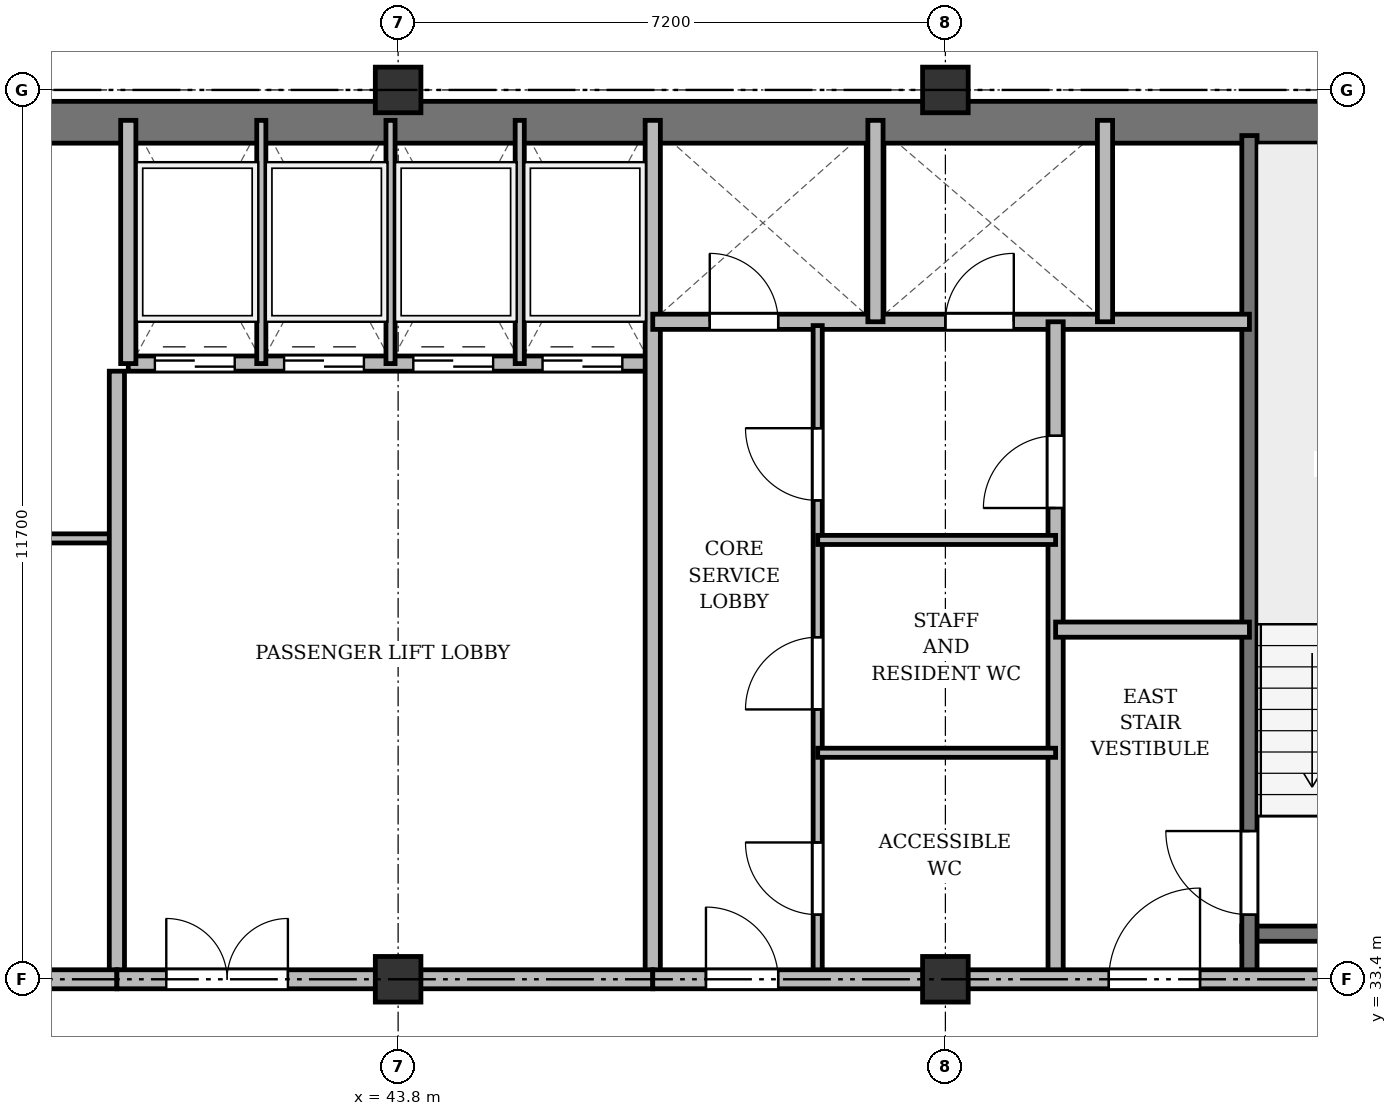
"""IFC4 building model, lengths in metres.
Left out: names, types, materials, properties, quantities, classifications, styles, units other than length and angle.
Written with IfcOpenShell. Run it as: python <this file> out.ifc"""

import sys

from ifc_helpers import new_model, si_unit, direction, frame, frame_2d, origin, origin_2d, place, context, subcontext, project, spatial, rectangle, extrude, source, transform, mapped, element, fill, save


model = new_model("IFC4")
c1 = context("Model", 3, precision=1e-05, world=origin(), true_north=direction((0.0, 1.0)))
c2 = subcontext(c1, "Body", "Model", "MODEL_VIEW")
j1 = project(units=[si_unit("LENGTHUNIT", "METRE"), si_unit("PLANEANGLEUNIT", "RADIAN")], contexts=[c1])
p1 = place(None, origin())
s1 = spatial("IfcSite", under=j1, at=p1, CompositionType="ELEMENT")
p2 = place(p1, origin())
s2 = spatial("IfcBuilding", under=s1, at=p2, CompositionType="ELEMENT")
p3 = place(p2, frame((0.0, 0.0, 259.5)))
s3 = spatial("IfcBuildingStorey", under=s2, at=p3, CompositionType="ELEMENT", Elevation=259.5)
m1 = source(origin(), c2, "Body", "SweptSolid", [
    extrude(rectangle(XDim=0.6, YDim=0.6, at=origin_2d()), origin(), (0.0, 0.0, 1.0), 3.6),
])
for number, where, z_axis, x_axis in (
    (1, (43.8, 33.4, 0.0), (0.0, 0.0, 1.0), (1.0, 0.0, 0.0)),
    (2, (43.8, 45.1, 0.0), (0.0, 0.0, 1.0), (1.0, 0.0, 0.0)),
    (3, (51.0, 33.4, 0.0), (0.0, 0.0, 1.0), (1.0, 0.0, 0.0)),
    (4, (51.0, 45.1, 0.0), (0.0, 0.0, 1.0), (1.0, 0.0, 0.0)),
):
    element("IfcColumn", number, at=place(p3, frame(where, z_axis=z_axis, x_axis=x_axis)), inside=s3, PredefinedType="COLUMN", context=c2, shape_type="MappedRepresentation", body=[
        mapped(m1, transform((0.0, 0.0, 0.0), x_axis=(1.0, 0.0, 0.0), y_axis=(0.0, 1.0, 0.0), z_axis=(0.0, 0.0, 1.0), scale=1.0)),
    ])
p4 = place(p3, frame((15.65, 44.675, 0.0), z_axis=(0.0, 0.0, 1.0), x_axis=(1.0, 0.0, 0.0)))
e5 = element("IfcWall", 5, at=p4, inside=s3, PredefinedType="SHEAR", context=c2, shape_type="SweptSolid", body=[
    extrude(rectangle(XDim=43.1, YDim=0.55, at=frame_2d((21.55, 0.0))), origin(), (0.0, 0.0, 1.0), 3.37),
])
p5 = place(p3, frame((54.9, 34.0, 0.0), z_axis=(0.0, 0.0, 1.0), x_axis=(1.0, 0.0, 0.0)))
e6 = element("IfcWall", 6, at=p5, inside=s3, PredefinedType="SHEAR", context=c2, shape_type="SweptSolid", body=[
    extrude(rectangle(XDim=3.4, YDim=0.2, at=frame_2d((1.7, 0.0))), origin(), (0.0, 0.0, 1.0), 3.37),
])
p6 = place(p3, frame((55.0, 33.4, 0.0), z_axis=(0.0, 0.0, 1.0), x_axis=(0.0, 1.0, 0.0)))
e7 = element("IfcWall", 7, at=p6, inside=s3, PredefinedType="SHEAR", context=c2, shape_type="SweptSolid", body=[
    extrude(rectangle(XDim=11.1, YDim=0.2, at=frame_2d((5.55, 0.0))), origin(), (0.0, 0.0, 1.0), 3.37),
])
p7 = place(p6, frame((0.85, 0.0, 0.0)))
e8 = element("IfcOpeningElement", 8, at=p7, cuts=e7, PredefinedType="OPENING", context=c2, shape_type="SweptSolid", body=[
    extrude(rectangle(XDim=1.1, YDim=2.15, at=frame_2d((0.55, 1.075))), frame((0.0, 0.11, 0.0), z_axis=(0.0, -1.0, 0.0), x_axis=(1.0, 0.0, 0.0)), (0.0, 0.0, 1.0), 0.22),
])
p8 = place(p3, frame((33.3, 39.2, 0.0), z_axis=(0.0, 0.0, 1.0), x_axis=(1.0, 0.0, 0.0)))
e9 = element("IfcWall", 9, at=p8, inside=s3, PredefinedType="PARTITIONING", context=c2, shape_type="SweptSolid", body=[
    extrude(rectangle(XDim=6.8, YDim=0.12, at=frame_2d((3.4, 0.0))), origin(), (0.0, 0.0, 1.0), 3.37),
])
p9 = place(p8, frame((2.6, 0.0, 0.0)))
e10 = element("IfcOpeningElement", 10, at=p9, cuts=e9, PredefinedType="OPENING", context=c2, shape_type="SweptSolid", body=[
    extrude(rectangle(XDim=0.95, YDim=2.15, at=frame_2d((0.475, 1.075))), frame((0.0, 0.07, 0.0), z_axis=(0.0, -1.0, 0.0), x_axis=(1.0, 0.0, 0.0)), (0.0, 0.0, 1.0), 0.14),
])
p10 = place(p3, frame((40.1, 33.4, 0.0), z_axis=(0.0, 0.0, 1.0), x_axis=(0.0, 1.0, 0.0)))
e11 = element("IfcWall", 11, at=p10, inside=s3, PredefinedType="SOLIDWALL", context=c2, shape_type="SweptSolid", body=[
    extrude(rectangle(XDim=8.0, YDim=0.2, at=frame_2d((4.0, 0.0))), origin(), (0.0, 0.0, 1.0), 2.92),
])
p11 = place(p3, frame((40.25, 41.5, 0.0), z_axis=(0.0, 0.0, 1.0), x_axis=(1.0, 0.0, 0.0)))
e12 = element("IfcWall", 12, at=p11, inside=s3, PredefinedType="SOLIDWALL", context=c2, shape_type="SweptSolid", body=[
    extrude(rectangle(XDim=6.9, YDim=0.2, at=frame_2d((3.45, 0.0))), origin(), (0.0, 0.0, 1.0), 3.37),
])
p12 = place(p11, frame((0.35, 0.0, 0.0)))
e13 = element("IfcOpeningElement", 13, at=p12, cuts=e12, PredefinedType="OPENING", context=c2, shape_type="SweptSolid", body=[
    extrude(rectangle(XDim=1.05, YDim=2.15, at=frame_2d((0.525, 1.075))), frame((0.0, 0.11, 0.0), z_axis=(0.0, -1.0, 0.0), x_axis=(1.0, 0.0, 0.0)), (0.0, 0.0, 1.0), 0.22),
])
p13 = place(p11, frame((2.05, 0.0, 0.0)))
e14 = element("IfcOpeningElement", 14, at=p13, cuts=e12, PredefinedType="OPENING", context=c2, shape_type="SweptSolid", body=[
    extrude(rectangle(XDim=1.05, YDim=2.15, at=frame_2d((0.525, 1.075))), frame((0.0, 0.11, 0.0), z_axis=(0.0, -1.0, 0.0), x_axis=(1.0, 0.0, 0.0)), (0.0, 0.0, 1.0), 0.22),
])
p14 = place(p11, frame((3.75, 0.0, 0.0)))
e15 = element("IfcOpeningElement", 15, at=p14, cuts=e12, PredefinedType="OPENING", context=c2, shape_type="SweptSolid", body=[
    extrude(rectangle(XDim=1.05, YDim=2.15, at=frame_2d((0.525, 1.075))), frame((0.0, 0.11, 0.0), z_axis=(0.0, -1.0, 0.0), x_axis=(1.0, 0.0, 0.0)), (0.0, 0.0, 1.0), 0.22),
])
p15 = place(p11, frame((5.45, 0.0, 0.0)))
e16 = element("IfcOpeningElement", 16, at=p15, cuts=e12, PredefinedType="OPENING", context=c2, shape_type="SweptSolid", body=[
    extrude(rectangle(XDim=1.05, YDim=2.15, at=frame_2d((0.525, 1.075))), frame((0.0, 0.11, 0.0), z_axis=(0.0, -1.0, 0.0), x_axis=(1.0, 0.0, 0.0)), (0.0, 0.0, 1.0), 0.22),
])
p16 = place(p3, frame((40.25, 41.5, 0.0), z_axis=(0.0, 0.0, 1.0), x_axis=(0.0, 1.0, 0.0)))
e17 = element("IfcWall", 17, at=p16, inside=s3, PredefinedType="SOLIDWALL", context=c2, shape_type="SweptSolid", body=[
    extrude(rectangle(XDim=3.2, YDim=0.2, at=frame_2d((1.6, 0.0))), origin(), (0.0, 0.0, 1.0), 3.37),
])
for number, where, z_axis, x_axis in (
    (18, (42.0, 41.5, 0.0), (0.0, 0.0, 1.0), (0.0, 1.0, 0.0)),
    (19, (43.7, 41.5, 0.0), (0.0, 0.0, 1.0), (0.0, 1.0, 0.0)),
    (20, (45.4, 41.5, 0.0), (0.0, 0.0, 1.0), (0.0, 1.0, 0.0)),
):
    element("IfcWall", number, at=place(p3, frame(where, z_axis=z_axis, x_axis=x_axis)), inside=s3, PredefinedType="PARTITIONING", context=c2, shape_type="SweptSolid", body=[
        extrude(rectangle(XDim=3.2, YDim=0.12, at=frame_2d((1.6, 0.0))), origin(), (0.0, 0.0, 1.0), 3.37),
    ])
p17 = place(p3, frame((47.15, 33.4, 0.0), z_axis=(0.0, 0.0, 1.0), x_axis=(0.0, 1.0, 0.0)))
e21 = element("IfcWall", 21, at=p17, inside=s3, PredefinedType="SOLIDWALL", context=c2, shape_type="SweptSolid", body=[
    extrude(rectangle(XDim=11.3, YDim=0.2, at=frame_2d((5.65, 0.0))), origin(), (0.0, 0.0, 1.0), 2.92),
])
p18 = place(p3, frame((33.3, 33.4, 0.0), z_axis=(0.0, 0.0, 1.0), x_axis=(1.0, 0.0, 0.0)))
e22 = element("IfcWall", 22, at=p18, inside=s3, PredefinedType="PARTITIONING", context=c2, shape_type="SweptSolid", body=[
    extrude(rectangle(XDim=6.8, YDim=0.25, at=frame_2d((3.4, 0.0))), origin(), (0.0, 0.0, 1.0), 2.92),
])
p19 = place(p18, frame((2.4, 0.0, 0.0)))
e23 = element("IfcOpeningElement", 23, at=p19, cuts=e22, PredefinedType="OPENING", context=c2, shape_type="SweptSolid", body=[
    extrude(rectangle(XDim=1.0, YDim=2.15, at=frame_2d((0.5, 1.075))), frame((0.0, 0.135, 0.0), z_axis=(0.0, -1.0, 0.0), x_axis=(1.0, 0.0, 0.0)), (0.0, 0.0, 1.0), 0.27),
])
p20 = place(p3, frame((40.1, 33.4, 0.0), z_axis=(0.0, 0.0, 1.0), x_axis=(1.0, 0.0, 0.0)))
e24 = element("IfcWall", 24, at=p20, inside=s3, PredefinedType="PARTITIONING", context=c2, shape_type="SweptSolid", body=[
    extrude(rectangle(XDim=7.05, YDim=0.25, at=frame_2d((3.525, 0.0))), origin(), (0.0, 0.0, 1.0), 2.92),
])
p21 = place(p20, frame((0.65, 0.0, 0.0)))
e25 = element("IfcOpeningElement", 25, at=p21, cuts=e24, PredefinedType="OPENING", context=c2, shape_type="SweptSolid", body=[
    extrude(rectangle(XDim=1.6, YDim=2.2, at=frame_2d((0.8, 1.1))), frame((0.0, 0.135, 0.0), z_axis=(0.0, -1.0, 0.0), x_axis=(1.0, 0.0, 0.0)), (0.0, 0.0, 1.0), 0.27),
])
p22 = place(p3, frame((47.15, 42.05, 0.0), z_axis=(0.0, 0.0, 1.0), x_axis=(1.0, 0.0, 0.0)))
e26 = element("IfcWall", 26, at=p22, inside=s3, PredefinedType="SOLIDWALL", context=c2, shape_type="SweptSolid", body=[
    extrude(rectangle(XDim=7.85, YDim=0.2, at=frame_2d((3.925, 0.0))), origin(), (0.0, 0.0, 1.0), 2.87),
])
p23 = place(p22, frame((0.75, 0.0, 0.0)))
e27 = element("IfcOpeningElement", 27, at=p23, cuts=e26, PredefinedType="OPENING", context=c2, shape_type="SweptSolid", body=[
    extrude(rectangle(XDim=0.9, YDim=2.1, at=frame_2d((0.45, 1.05))), frame((0.0, 0.11, 0.0), z_axis=(0.0, -1.0, 0.0), x_axis=(1.0, 0.0, 0.0)), (0.0, 0.0, 1.0), 0.22),
])
p24 = place(p22, frame((3.85, 0.0, 0.0)))
e28 = element("IfcOpeningElement", 28, at=p24, cuts=e26, PredefinedType="OPENING", context=c2, shape_type="SweptSolid", body=[
    extrude(rectangle(XDim=0.9, YDim=2.1, at=frame_2d((0.45, 1.05))), frame((0.0, 0.11, 0.0), z_axis=(0.0, -1.0, 0.0), x_axis=(1.0, 0.0, 0.0)), (0.0, 0.0, 1.0), 0.22),
])
for number, where, z_axis, x_axis in (
    (29, (50.08, 42.05, 0.0), (0.0, 0.0, 1.0), (0.0, 1.0, 0.0)),
    (30, (53.1, 42.05, 0.0), (0.0, 0.0, 1.0), (0.0, 1.0, 0.0)),
):
    element("IfcWall", number, at=place(p3, frame(where, z_axis=z_axis, x_axis=x_axis)), inside=s3, PredefinedType="SOLIDWALL", context=c2, shape_type="SweptSolid", body=[
        extrude(rectangle(XDim=2.65, YDim=0.2, at=frame_2d((1.325, 0.0))), origin(), (0.0, 0.0, 1.0), 3.37),
    ])
p25 = place(p3, frame((52.45, 33.4, 0.0), z_axis=(0.0, 0.0, 1.0), x_axis=(0.0, 1.0, 0.0)))
e31 = element("IfcWall", 31, at=p25, inside=s3, PredefinedType="PARTITIONING", context=c2, shape_type="SweptSolid", body=[
    extrude(rectangle(XDim=8.65, YDim=0.2, at=frame_2d((4.325, 0.0))), origin(), (0.0, 0.0, 1.0), 2.92),
])
p26 = place(p25, frame((6.2, 0.0, 0.0)))
e32 = element("IfcOpeningElement", 32, at=p26, cuts=e31, PredefinedType="OPENING", context=c2, shape_type="SweptSolid", body=[
    extrude(rectangle(XDim=0.95, YDim=2.15, at=frame_2d((0.475, 1.075))), frame((0.0, 0.11, 0.0), z_axis=(0.0, -1.0, 0.0), x_axis=(1.0, 0.0, 0.0)), (0.0, 0.0, 1.0), 0.22),
])
p27 = place(p3, frame((52.45, 38.0, 0.0), z_axis=(0.0, 0.0, 1.0), x_axis=(1.0, 0.0, 0.0)))
e33 = element("IfcWall", 33, at=p27, inside=s3, PredefinedType="PARTITIONING", context=c2, shape_type="SweptSolid", body=[
    extrude(rectangle(XDim=2.55, YDim=0.2, at=frame_2d((1.275, 0.0))), origin(), (0.0, 0.0, 1.0), 3.37),
])
p28 = place(p3, frame((49.32, 33.4, 0.0), z_axis=(0.0, 0.0, 1.0), x_axis=(0.0, 1.0, 0.0)))
e34 = element("IfcWall", 34, at=p28, inside=s3, PredefinedType="PARTITIONING", context=c2, shape_type="SweptSolid", body=[
    extrude(rectangle(XDim=8.6, YDim=0.12, at=frame_2d((4.3, 0.0))), origin(), (0.0, 0.0, 1.0), 2.92),
])
p29 = place(p28, frame((0.85, 0.0, 0.0)))
e35 = element("IfcOpeningElement", 35, at=p29, cuts=e34, PredefinedType="OPENING", context=c2, shape_type="SweptSolid", body=[
    extrude(rectangle(XDim=0.95, YDim=2.15, at=frame_2d((0.475, 1.075))), frame((0.0, 0.07, 0.0), z_axis=(0.0, -1.0, 0.0), x_axis=(1.0, 0.0, 0.0)), (0.0, 0.0, 1.0), 0.14),
])
p30 = place(p28, frame((3.55, 0.0, 0.0)))
e36 = element("IfcOpeningElement", 36, at=p30, cuts=e34, PredefinedType="OPENING", context=c2, shape_type="SweptSolid", body=[
    extrude(rectangle(XDim=0.95, YDim=2.15, at=frame_2d((0.475, 1.075))), frame((0.0, 0.07, 0.0), z_axis=(0.0, -1.0, 0.0), x_axis=(1.0, 0.0, 0.0)), (0.0, 0.0, 1.0), 0.14),
])
p31 = place(p28, frame((6.3, 0.0, 0.0)))
e37 = element("IfcOpeningElement", 37, at=p31, cuts=e34, PredefinedType="OPENING", context=c2, shape_type="SweptSolid", body=[
    extrude(rectangle(XDim=0.95, YDim=2.15, at=frame_2d((0.475, 1.075))), frame((0.0, 0.07, 0.0), z_axis=(0.0, -1.0, 0.0), x_axis=(1.0, 0.0, 0.0)), (0.0, 0.0, 1.0), 0.14),
])
for number, where, z_axis, x_axis in (
    (38, (49.32, 36.38, 0.0), (0.0, 0.0, 1.0), (1.0, 0.0, 0.0)),
    (39, (49.32, 39.18, 0.0), (0.0, 0.0, 1.0), (1.0, 0.0, 0.0)),
):
    element("IfcWall", number, at=place(p3, frame(where, z_axis=z_axis, x_axis=x_axis)), inside=s3, PredefinedType="PARTITIONING", context=c2, shape_type="SweptSolid", body=[
        extrude(rectangle(XDim=3.13, YDim=0.12, at=frame_2d((1.565, 0.0))), origin(), (0.0, 0.0, 1.0), 2.87),
    ])
p32 = place(p3, frame((47.15, 33.4, 0.0), z_axis=(0.0, 0.0, 1.0), x_axis=(1.0, 0.0, 0.0)))
e40 = element("IfcWall", 40, at=p32, inside=s3, PredefinedType="PARTITIONING", context=c2, shape_type="SweptSolid", body=[
    extrude(rectangle(XDim=11.15, YDim=0.25, at=frame_2d((5.575, 0.0))), origin(), (0.0, 0.0, 1.0), 2.92),
])
p33 = place(p32, frame((0.7, 0.0, 0.0)))
e41 = element("IfcOpeningElement", 41, at=p33, cuts=e40, PredefinedType="OPENING", context=c2, shape_type="SweptSolid", body=[
    extrude(rectangle(XDim=0.95, YDim=2.15, at=frame_2d((0.475, 1.075))), frame((0.0, 0.135, 0.0), z_axis=(0.0, -1.0, 0.0), x_axis=(1.0, 0.0, 0.0)), (0.0, 0.0, 1.0), 0.27),
])
p34 = place(p32, frame((6.0, 0.0, 0.0)))
e42 = element("IfcOpeningElement", 42, at=p34, cuts=e40, PredefinedType="OPENING", context=c2, shape_type="SweptSolid", body=[
    extrude(rectangle(XDim=1.2, YDim=2.15, at=frame_2d((0.6, 1.075))), frame((0.0, 0.135, 0.0), z_axis=(0.0, -1.0, 0.0), x_axis=(1.0, 0.0, 0.0)), (0.0, 0.0, 1.0), 0.27),
])
m2 = source(origin(), c2, "Body", "SweptSolid", [
    extrude(rectangle(XDim=1.1, YDim=2.15, at=frame_2d((0.55, 1.075))), frame((0.0, 0.025, 0.0), z_axis=(0.0, -1.0, 0.0), x_axis=(1.0, 0.0, 0.0)), (0.0, 0.0, 1.0), 0.05),
])
p35 = place(p7, origin())
e43 = element("IfcDoor", 43, at=p35, inside=s3, OperationType="SINGLE_SWING_RIGHT", PredefinedType="DOOR", context=c2, shape_type="MappedRepresentation", body=[
    mapped(m2, transform((0.0, 0.0, 0.0), x_axis=(1.0, 0.0, 0.0), y_axis=(0.0, 1.0, 0.0), z_axis=(0.0, 0.0, 1.0), scale=1.0)),
])
fill(e8, e43)
m3 = source(origin(), c2, "Body", "SweptSolid", [
    extrude(rectangle(XDim=1.05, YDim=2.15, at=frame_2d((0.525, 1.075))), frame((0.0, 0.025, 0.0), z_axis=(0.0, -1.0, 0.0), x_axis=(1.0, 0.0, 0.0)), (0.0, 0.0, 1.0), 0.05),
])
p36 = place(p12, origin())
e44 = element("IfcDoor", 44, at=p36, inside=s3, OperationType="DOUBLE_DOOR_SLIDING", PredefinedType="DOOR", context=c2, shape_type="MappedRepresentation", body=[
    mapped(m3, transform((0.0, 0.0, 0.0), x_axis=(1.0, 0.0, 0.0), y_axis=(0.0, 1.0, 0.0), z_axis=(0.0, 0.0, 1.0), scale=1.0)),
])
fill(e13, e44)
p37 = place(p13, origin())
e45 = element("IfcDoor", 45, at=p37, inside=s3, OperationType="DOUBLE_DOOR_SLIDING", PredefinedType="DOOR", context=c2, shape_type="MappedRepresentation", body=[
    mapped(m3, transform((0.0, 0.0, 0.0), x_axis=(1.0, 0.0, 0.0), y_axis=(0.0, 1.0, 0.0), z_axis=(0.0, 0.0, 1.0), scale=1.0)),
])
fill(e14, e45)
p38 = place(p14, origin())
e46 = element("IfcDoor", 46, at=p38, inside=s3, OperationType="DOUBLE_DOOR_SLIDING", PredefinedType="DOOR", context=c2, shape_type="MappedRepresentation", body=[
    mapped(m3, transform((0.0, 0.0, 0.0), x_axis=(1.0, 0.0, 0.0), y_axis=(0.0, 1.0, 0.0), z_axis=(0.0, 0.0, 1.0), scale=1.0)),
])
fill(e15, e46)
p39 = place(p15, origin())
e47 = element("IfcDoor", 47, at=p39, inside=s3, OperationType="DOUBLE_DOOR_SLIDING", PredefinedType="DOOR", context=c2, shape_type="MappedRepresentation", body=[
    mapped(m3, transform((0.0, 0.0, 0.0), x_axis=(1.0, 0.0, 0.0), y_axis=(0.0, 1.0, 0.0), z_axis=(0.0, 0.0, 1.0), scale=1.0)),
])
fill(e16, e47)
m4 = source(origin(), c2, "Body", "SweptSolid", [
    extrude(rectangle(XDim=1.6, YDim=2.2, at=frame_2d((0.8, 1.1))), frame((0.0, 0.025, 0.0), z_axis=(0.0, -1.0, 0.0), x_axis=(1.0, 0.0, 0.0)), (0.0, 0.0, 1.0), 0.05),
])
p40 = place(p21, origin())
e48 = element("IfcDoor", 48, at=p40, inside=s3, OperationType="DOUBLE_DOOR_SINGLE_SWING", PredefinedType="DOOR", context=c2, shape_type="MappedRepresentation", body=[
    mapped(m4, transform((0.0, 0.0, 0.0), x_axis=(1.0, 0.0, 0.0), y_axis=(0.0, 1.0, 0.0), z_axis=(0.0, 0.0, 1.0), scale=1.0)),
])
fill(e25, e48)
m5 = source(origin(), c2, "Body", "SweptSolid", [
    extrude(rectangle(XDim=0.9, YDim=2.1, at=frame_2d((0.45, 1.05))), frame((0.0, 0.025, 0.0), z_axis=(0.0, -1.0, 0.0), x_axis=(1.0, 0.0, 0.0)), (0.0, 0.0, 1.0), 0.05),
])
p41 = place(p23, origin())
e49 = element("IfcDoor", 49, at=p41, inside=s3, OperationType="SINGLE_SWING_LEFT", PredefinedType="DOOR", context=c2, shape_type="MappedRepresentation", body=[
    mapped(m5, transform((0.0, 0.0, 0.0), x_axis=(1.0, 0.0, 0.0), y_axis=(0.0, 1.0, 0.0), z_axis=(0.0, 0.0, 1.0), scale=1.0)),
])
fill(e27, e49)
p42 = place(p24, origin())
e50 = element("IfcDoor", 50, at=p42, inside=s3, OperationType="SINGLE_SWING_RIGHT", PredefinedType="DOOR", context=c2, shape_type="MappedRepresentation", body=[
    mapped(m5, transform((0.0, 0.0, 0.0), x_axis=(1.0, 0.0, 0.0), y_axis=(0.0, 1.0, 0.0), z_axis=(0.0, 0.0, 1.0), scale=1.0)),
])
fill(e28, e50)
m6 = source(origin(), c2, "Body", "SweptSolid", [
    extrude(rectangle(XDim=0.95, YDim=2.15, at=frame_2d((0.475, 1.075))), frame((0.0, 0.025, 0.0), z_axis=(0.0, -1.0, 0.0), x_axis=(1.0, 0.0, 0.0)), (0.0, 0.0, 1.0), 0.05),
])
p43 = place(p26, origin())
e51 = element("IfcDoor", 51, at=p43, inside=s3, OperationType="SINGLE_SWING_LEFT", PredefinedType="DOOR", context=c2, shape_type="MappedRepresentation", body=[
    mapped(m6, transform((0.0, 0.0, 0.0), x_axis=(1.0, 0.0, 0.0), y_axis=(0.0, 1.0, 0.0), z_axis=(0.0, 0.0, 1.0), scale=1.0)),
])
fill(e32, e51)
p44 = place(p29, origin())
e52 = element("IfcDoor", 52, at=p44, inside=s3, OperationType="SINGLE_SWING_RIGHT", PredefinedType="DOOR", context=c2, shape_type="MappedRepresentation", body=[
    mapped(m6, transform((0.0, 0.0, 0.0), x_axis=(1.0, 0.0, 0.0), y_axis=(0.0, 1.0, 0.0), z_axis=(0.0, 0.0, 1.0), scale=1.0)),
])
fill(e35, e52)
p45 = place(p30, origin())
e53 = element("IfcDoor", 53, at=p45, inside=s3, OperationType="SINGLE_SWING_LEFT", PredefinedType="DOOR", context=c2, shape_type="MappedRepresentation", body=[
    mapped(m6, transform((0.0, 0.0, 0.0), x_axis=(1.0, 0.0, 0.0), y_axis=(0.0, 1.0, 0.0), z_axis=(0.0, 0.0, 1.0), scale=1.0)),
])
fill(e36, e53)
p46 = place(p31, origin())
e54 = element("IfcDoor", 54, at=p46, inside=s3, OperationType="SINGLE_SWING_RIGHT", PredefinedType="DOOR", context=c2, shape_type="MappedRepresentation", body=[
    mapped(m6, transform((0.0, 0.0, 0.0), x_axis=(1.0, 0.0, 0.0), y_axis=(0.0, 1.0, 0.0), z_axis=(0.0, 0.0, 1.0), scale=1.0)),
])
fill(e37, e54)
p47 = place(p33, origin())
e55 = element("IfcDoor", 55, at=p47, inside=s3, OperationType="SINGLE_SWING_LEFT", PredefinedType="DOOR", context=c2, shape_type="MappedRepresentation", body=[
    mapped(m6, transform((0.0, 0.0, 0.0), x_axis=(1.0, 0.0, 0.0), y_axis=(0.0, 1.0, 0.0), z_axis=(0.0, 0.0, 1.0), scale=1.0)),
])
fill(e41, e55)
m7 = source(origin(), c2, "Body", "SweptSolid", [
    extrude(rectangle(XDim=1.2, YDim=2.15, at=frame_2d((0.6, 1.075))), frame((0.0, 0.025, 0.0), z_axis=(0.0, -1.0, 0.0), x_axis=(1.0, 0.0, 0.0)), (0.0, 0.0, 1.0), 0.05),
])
p48 = place(p34, origin())
e56 = element("IfcDoor", 56, at=p48, inside=s3, OperationType="SINGLE_SWING_RIGHT", PredefinedType="DOOR", context=c2, shape_type="MappedRepresentation", body=[
    mapped(m7, transform((0.0, 0.0, 0.0), x_axis=(1.0, 0.0, 0.0), y_axis=(0.0, 1.0, 0.0), z_axis=(0.0, 0.0, 1.0), scale=1.0)),
])
fill(e42, e56)
save(model, sys.argv[1])
